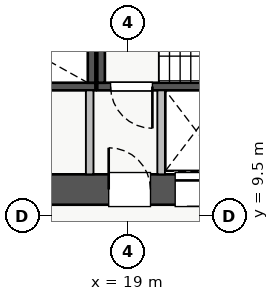
"""IFC4 building model, lengths in metres.
Left out: names, types, materials, properties, quantities, classifications, styles, units other than length and angle.
Written with IfcOpenShell. Run it as: python <this file> out.ifc"""

import sys

from ifc_helpers import new_model, si_unit, direction, frame, frame_2d, origin, place, context, subcontext, project, spatial, rectangle, extrude, source, transform, mapped, element, fill, save


model = new_model("IFC4")
c1 = context("Model", 3, precision=1e-05, world=origin(), true_north=direction((0.0, 1.0)))
c2 = subcontext(c1, "Body", "Model", "MODEL_VIEW")
j1 = project(units=[si_unit("LENGTHUNIT", "METRE"), si_unit("PLANEANGLEUNIT", "RADIAN")], contexts=[c1])
p1 = place(None, origin())
s1 = spatial("IfcSite", under=j1, at=p1, CompositionType="ELEMENT")
p2 = place(p1, origin())
s2 = spatial("IfcBuilding", under=s1, at=p2, CompositionType="ELEMENT")
p3 = place(p2, frame((0.0, 0.0, 86.0)))
s3 = spatial("IfcBuildingStorey", under=s2, at=p3, CompositionType="ELEMENT", Elevation=86.0)
p4 = place(p3, frame((19.88, 12.8, 0.0), z_axis=(0.0, 0.0, 1.0), x_axis=(1.0, 0.0, 0.0)))
e1 = element("IfcWall", 1, at=p4, inside=s3, PredefinedType="SHEAR", context=c2, shape_type="SweptSolid", body=[
    extrude(rectangle(XDim=1.87, YDim=0.18, at=frame_2d((0.935, 0.0))), origin(), (0.0, 0.0, 1.0), 3.07),
])
p5 = place(p3, frame((11.0, 12.91, 0.0), z_axis=(0.0, 0.0, 1.0), x_axis=(1.0, 0.0, 0.0)))
e2 = element("IfcWall", 2, at=p5, inside=s3, PredefinedType="SHEAR", context=c2, shape_type="SweptSolid", body=[
    extrude(rectangle(XDim=7.15, YDim=0.2, at=frame_2d((3.575, 0.0))), origin(), (0.0, 0.0, 1.0), 3.25),
])
p6 = place(p5, frame((0.35, 0.0, 0.0)))
e3 = element("IfcOpeningElement", 3, at=p6, cuts=e2, PredefinedType="OPENING", context=c2, shape_type="SweptSolid", body=[
    extrude(rectangle(XDim=1.1, YDim=2.05, at=frame_2d((0.55, 1.025))), frame((0.0, 0.11, 0.0), z_axis=(0.0, -1.0, 0.0), x_axis=(1.0, 0.0, 0.0)), (0.0, 0.0, 1.0), 0.22),
])
p7 = place(p3, frame((18.05, 13.01, 0.0), z_axis=(0.0, 0.0, 1.0), x_axis=(0.0, 1.0, 0.0)))
e4 = element("IfcWall", 4, at=p7, inside=s3, PredefinedType="SHEAR", context=c2, shape_type="SweptSolid", body=[
    extrude(rectangle(XDim=2.94, YDim=0.2, at=frame_2d((1.47, 0.0))), origin(), (0.0, 0.0, 1.0), 3.25),
])
p8 = place(p3, frame((18.2, 12.91, 0.0), z_axis=(0.0, 0.0, 1.0), x_axis=(1.0, 0.0, 0.0)))
e5 = element("IfcWall", 5, at=p8, inside=s3, PredefinedType="SHEAR", context=c2, shape_type="SweptSolid", body=[
    extrude(rectangle(XDim=7.15, YDim=0.2, at=frame_2d((3.575, 0.0))), origin(), (0.0, 0.0, 1.0), 3.25),
])
p9 = place(p8, frame((0.35, 0.0, 0.0)))
e6 = element("IfcOpeningElement", 6, at=p9, cuts=e5, PredefinedType="OPENING", context=c2, shape_type="SweptSolid", body=[
    extrude(rectangle(XDim=1.1, YDim=2.05, at=frame_2d((0.55, 1.025))), frame((0.0, 0.11, 0.0), z_axis=(0.0, -1.0, 0.0), x_axis=(1.0, 0.0, 0.0)), (0.0, 0.0, 1.0), 0.22),
])
p10 = place(p3, frame((18.3, 13.01, 0.0), z_axis=(0.0, 0.0, 1.0), x_axis=(0.0, 1.0, 0.0)))
e7 = element("IfcWall", 7, at=p10, inside=s3, PredefinedType="SHEAR", context=c2, shape_type="SweptSolid", body=[
    extrude(rectangle(XDim=2.94, YDim=0.2, at=frame_2d((1.47, 0.0))), origin(), (0.0, 0.0, 1.0), 3.25),
])
p11 = place(p3, frame((10.2, 10.2, 0.0), z_axis=(0.0, 0.0, 1.0), x_axis=(1.0, 0.0, 0.0)))
e8 = element("IfcWall", 8, at=p11, inside=s3, PredefinedType="SHEAR", context=c2, shape_type="SweptSolid", body=[
    extrude(rectangle(XDim=17.6, YDim=0.8, at=frame_2d((8.8, 0.0))), origin(), (0.0, 0.0, 1.0), 3.25),
])
p12 = place(p11, frame((1.15, 0.0, 0.0)))
e9 = element("IfcOpeningElement", 9, at=p12, cuts=e8, PredefinedType="OPENING", context=c2, shape_type="SweptSolid", body=[
    extrude(rectangle(XDim=1.1, YDim=2.05, at=frame_2d((0.55, 1.025))), frame((0.0, 0.41, 0.0), z_axis=(0.0, -1.0, 0.0), x_axis=(1.0, 0.0, 0.0)), (0.0, 0.0, 1.0), 0.82),
])
p13 = place(p11, frame((8.3, 0.0, 0.0)))
e10 = element("IfcOpeningElement", 10, at=p13, cuts=e8, PredefinedType="OPENING", context=c2, shape_type="SweptSolid", body=[
    extrude(rectangle(XDim=1.1, YDim=2.05, at=frame_2d((0.55, 1.025))), frame((0.0, 0.41, 0.0), z_axis=(0.0, -1.0, 0.0), x_axis=(1.0, 0.0, 0.0)), (0.0, 0.0, 1.0), 0.82),
])
p14 = place(p11, frame((10.05, 0.0, 0.0)))
e11 = element("IfcOpeningElement", 11, at=p14, cuts=e8, PredefinedType="OPENING", context=c2, shape_type="SweptSolid", body=[
    extrude(rectangle(XDim=1.1, YDim=2.05, at=frame_2d((0.55, 1.025))), frame((0.0, 0.41, 0.0), z_axis=(0.0, -1.0, 0.0), x_axis=(1.0, 0.0, 0.0)), (0.0, 0.0, 1.0), 0.82),
])
p15 = place(p11, frame((14.74, 0.0, 0.0)))
e12 = element("IfcOpeningElement", 12, at=p15, cuts=e8, PredefinedType="OPENING", context=c2, shape_type="SweptSolid", body=[
    extrude(rectangle(XDim=1.0, YDim=2.05, at=frame_2d((0.5, 1.025))), frame((0.0, 0.41, 0.0), z_axis=(0.0, -1.0, 0.0), x_axis=(1.0, 0.0, 0.0)), (0.0, 0.0, 1.0), 0.82),
])
p16 = place(p11, frame((11.945, 0.0, 0.0)))
e13 = element("IfcOpeningElement", 13, at=p16, cuts=e8, PredefinedType="OPENING", context=c2, shape_type="SweptSolid", body=[
    extrude(rectangle(XDim=1.0, YDim=2.05, at=frame_2d((0.5, 1.025))), frame((0.0, 0.41, 0.0), z_axis=(0.0, -1.0, 0.0), x_axis=(1.0, 0.0, 0.0)), (0.0, 0.0, 1.0), 0.82),
])
p17 = place(p11, frame((13.48, 0.0, 0.0)))
e14 = element("IfcOpeningElement", 14, at=p17, cuts=e8, PredefinedType="OPENING", context=c2, shape_type="SweptSolid", body=[
    extrude(rectangle(XDim=1.0, YDim=2.05, at=frame_2d((0.5, 1.025))), frame((0.0, 0.41, 0.0), z_axis=(0.0, -1.0, 0.0), x_axis=(1.0, 0.0, 0.0)), (0.0, 0.0, 1.0), 0.82),
])
for number, where, z_axis, x_axis in (
    (15, (18.0, 10.6, 0.0), (0.0, 0.0, 1.0), (0.0, 1.0, 0.0)),
    (16, (19.88, 10.6, 0.0), (0.0, 0.0, 1.0), (0.0, 1.0, 0.0)),
):
    element("IfcWall", number, at=place(p3, frame(where, z_axis=z_axis, x_axis=x_axis)), inside=s3, PredefinedType="PARTITIONING", context=c2, shape_type="SweptSolid", body=[
        extrude(rectangle(XDim=2.21, YDim=0.2, at=frame_2d((1.105, 0.0))), origin(), (0.0, 0.0, 1.0), 3.07),
    ])
m1 = source(origin(), c2, "Body", "SweptSolid", [
    extrude(rectangle(XDim=1.1, YDim=2.05, at=frame_2d((0.55, 1.025))), frame((0.0, 0.025, 0.0), z_axis=(0.0, -1.0, 0.0), x_axis=(1.0, 0.0, 0.0)), (0.0, 0.0, 1.0), 0.05),
])
p18 = place(p13, origin())
e17 = element("IfcDoor", 17, at=p18, inside=s3, OperationType="SINGLE_SWING_LEFT", PredefinedType="DOOR", context=c2, shape_type="MappedRepresentation", body=[
    mapped(m1, transform((0.0, 0.0, 0.0), x_axis=(1.0, 0.0, 0.0), y_axis=(0.0, 1.0, 0.0), z_axis=(0.0, 0.0, 1.0), scale=1.0)),
])
fill(e10, e17)
p19 = place(p9, frame((1.1, 0.0, 0.0), z_axis=(0.0, 0.0, 1.0), x_axis=(-1.0, 0.0, 0.0)))
e18 = element("IfcDoor", 18, at=p19, inside=s3, OperationType="SINGLE_SWING_RIGHT", PredefinedType="DOOR", context=c2, shape_type="MappedRepresentation", body=[
    mapped(m1, transform((0.0, 0.0, 0.0), x_axis=(1.0, 0.0, 0.0), y_axis=(0.0, 1.0, 0.0), z_axis=(0.0, 0.0, 1.0), scale=1.0)),
])
fill(e6, e18)
p20 = place(p14, origin())
e19 = element("IfcDoor", 19, at=p20, inside=s3, OperationType="SLIDING_TO_RIGHT", PredefinedType="DOOR", context=c2, shape_type="MappedRepresentation", body=[
    mapped(m1, transform((0.0, 0.0, 0.0), x_axis=(1.0, 0.0, 0.0), y_axis=(0.0, 1.0, 0.0), z_axis=(0.0, 0.0, 1.0), scale=1.0)),
])
fill(e11, e19)
save(model, sys.argv[1])
